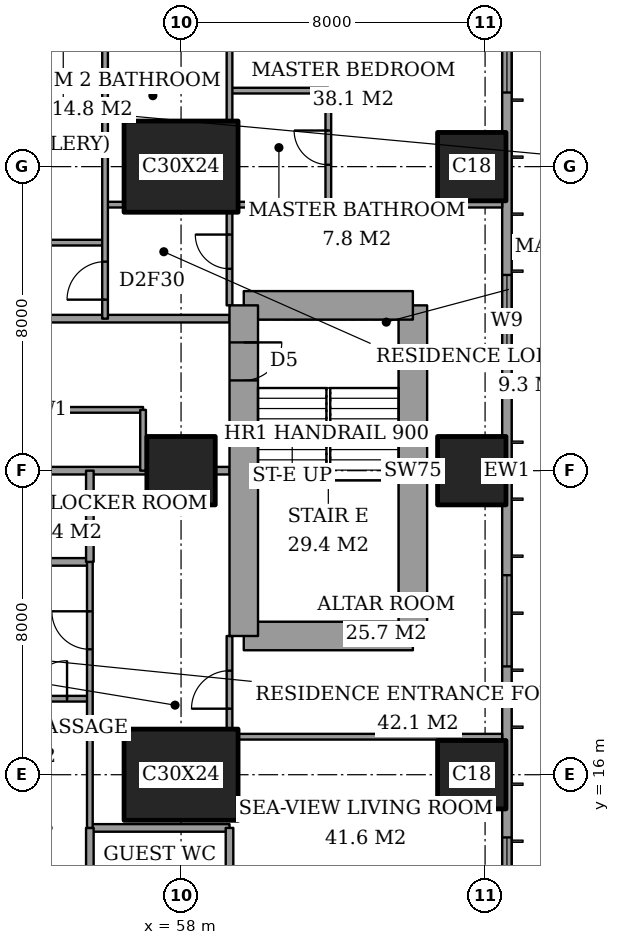
"""IFC4 building model, lengths in metres.
Left out: names, types, materials, properties, quantities, classifications, styles, units other than length and angle.
Written with IfcOpenShell. Run it as: python <this file> out.ifc"""

import sys

from ifc_helpers import new_model, si_unit, direction, frame, frame_2d, origin, origin_2d, place, context, subcontext, project, spatial, rectangle, extrude, element, fill, save


model = new_model("IFC4")
c1 = context("Model", 3, precision=1e-05, world=origin(), true_north=direction((0.0, 1.0)))
c2 = subcontext(c1, "Body", "Model", "MODEL_VIEW")
j1 = project(units=[si_unit("LENGTHUNIT", "METRE"), si_unit("PLANEANGLEUNIT", "RADIAN")], contexts=[c1])
p1 = place(None, origin())
s1 = spatial("IfcSite", under=j1, at=p1, CompositionType="ELEMENT")
p2 = place(p1, origin())
s2 = spatial("IfcBuilding", under=s1, at=p2, CompositionType="ELEMENT")
p3 = place(p2, frame((0.0, 0.0, 185.8)))
s3 = spatial("IfcBuildingStorey", under=s2, at=p3, CompositionType="ELEMENT", Elevation=185.8)
p4 = place(p3, frame((58.0, 16.0, 0.0), z_axis=(0.0, 0.0, 1.0), x_axis=(1.0, 0.0, 0.0)))
e1 = element("IfcColumn", 1, at=p4, inside=s3, PredefinedType="COLUMN", context=c2, shape_type="SweptSolid", body=[
    extrude(rectangle(XDim=3.0, YDim=2.4, at=origin_2d()), origin(), (0.0, 0.0, 1.0), 3.6),
])
p5 = place(p3, frame((58.0, 24.0, 0.0), z_axis=(0.0, 0.0, 1.0), x_axis=(1.0, 0.0, 0.0)))
e2 = element("IfcColumn", 2, at=p5, inside=s3, PredefinedType="COLUMN", context=c2, shape_type="SweptSolid", body=[
    extrude(rectangle(XDim=1.8, YDim=1.8, at=origin_2d()), origin(), (0.0, 0.0, 1.0), 3.6),
])
p6 = place(p3, frame((58.0, 32.0, 0.0), z_axis=(0.0, 0.0, 1.0), x_axis=(1.0, 0.0, 0.0)))
e3 = element("IfcColumn", 3, at=p6, inside=s3, PredefinedType="COLUMN", context=c2, shape_type="SweptSolid", body=[
    extrude(rectangle(XDim=3.0, YDim=2.4, at=origin_2d()), origin(), (0.0, 0.0, 1.0), 3.6),
])
for number, where, z_axis, x_axis in (
    (4, (65.65, 16.0, 0.0), (0.0, 0.0, 1.0), (1.0, 0.0, 0.0)),
    (5, (65.65, 24.0, 0.0), (0.0, 0.0, 1.0), (1.0, 0.0, 0.0)),
    (6, (65.65, 32.0, 0.0), (0.0, 0.0, 1.0), (1.0, 0.0, 0.0)),
):
    element("IfcColumn", number, at=place(p3, frame(where, z_axis=z_axis, x_axis=x_axis)), inside=s3, PredefinedType="COLUMN", context=c2, shape_type="SweptSolid", body=[
        extrude(rectangle(XDim=1.8, YDim=1.8, at=origin_2d()), origin(), (0.0, 0.0, 1.0), 3.6),
    ])
p7 = place(p3, frame((59.65, 19.65, 0.0), z_axis=(0.0, 0.0, 1.0), x_axis=(1.0, 0.0, 0.0)))
e7 = element("IfcWall", 7, at=p7, inside=s3, PredefinedType="SHEAR", context=c2, shape_type="SweptSolid", body=[
    extrude(rectangle(XDim=4.45, YDim=0.75, at=frame_2d((2.225, 0.0))), origin(), (0.0, 0.0, 1.0), 3.6),
])
p8 = place(p3, frame((64.1, 19.65, 0.0), z_axis=(0.0, 0.0, 1.0), x_axis=(0.0, 1.0, 0.0)))
e8 = element("IfcWall", 8, at=p8, inside=s3, PredefinedType="SHEAR", context=c2, shape_type="SweptSolid", body=[
    extrude(rectangle(XDim=8.7, YDim=0.75, at=frame_2d((4.35, 0.0))), origin(), (0.0, 0.0, 1.0), 3.6),
])
p9 = place(p3, frame((64.1, 28.35, 0.0), z_axis=(0.0, 0.0, 1.0), x_axis=(-1.0, 0.0, 0.0)))
e9 = element("IfcWall", 9, at=p9, inside=s3, PredefinedType="SHEAR", context=c2, shape_type="SweptSolid", body=[
    extrude(rectangle(XDim=4.45, YDim=0.75, at=frame_2d((2.225, 0.0))), origin(), (0.0, 0.0, 1.0), 3.6),
])
p10 = place(p3, frame((59.65, 28.35, 0.0), z_axis=(0.0, 0.0, 1.0), x_axis=(0.0, -1.0, 0.0)))
e10 = element("IfcWall", 10, at=p10, inside=s3, PredefinedType="SHEAR", context=c2, shape_type="SweptSolid", body=[
    extrude(rectangle(XDim=8.7, YDim=0.75, at=frame_2d((4.35, 0.0))), origin(), (0.0, 0.0, 1.0), 3.6),
])
p11 = place(p10, frame((0.975, 0.0, 0.0)))
e11 = element("IfcOpeningElement", 11, at=p11, cuts=e10, PredefinedType="OPENING", context=c2, shape_type="SweptSolid", body=[
    extrude(rectangle(XDim=1.0, YDim=2.1, at=frame_2d((0.5, 1.05))), frame((0.0, 0.385, 0.0), z_axis=(0.0, -1.0, 0.0), x_axis=(1.0, 0.0, 0.0)), (0.0, 0.0, 1.0), 0.77),
])
p12 = place(p3, frame((66.575, 3.175, 0.0), z_axis=(0.0, 0.0, 1.0), x_axis=(0.0, 1.0, 0.0)))
e12 = element("IfcWall", 12, at=p12, inside=s3, PredefinedType="SOLIDWALL", context=c2, shape_type="SweptSolid", body=[
    extrude(rectangle(XDim=41.65, YDim=0.25, at=frame_2d((20.825, 0.0))), origin(), (0.0, 0.0, 1.0), 3.6),
])
p13 = place(p12, frame((0.825, 0.0, 0.2)))
e13 = element("IfcOpeningElement", 13, at=p13, cuts=e12, PredefinedType="OPENING", context=c2, shape_type="SweptSolid", body=[
    extrude(rectangle(XDim=2.4, YDim=2.4, at=frame_2d((1.2, 1.2))), frame((0.0, 0.135, 0.0), z_axis=(0.0, -1.0, 0.0), x_axis=(1.0, 0.0, 0.0)), (0.0, 0.0, 1.0), 0.27),
])
p14 = place(p12, frame((6.6, 0.0, 0.2)))
e14 = element("IfcOpeningElement", 14, at=p14, cuts=e12, PredefinedType="OPENING", context=c2, shape_type="SweptSolid", body=[
    extrude(rectangle(XDim=1.2, YDim=2.4, at=frame_2d((0.6, 1.2))), frame((0.0, 0.135, 0.0), z_axis=(0.0, -1.0, 0.0), x_axis=(1.0, 0.0, 0.0)), (0.0, 0.0, 1.0), 0.27),
])
p15 = place(p12, frame((8.775, 0.0, 0.2)))
e15 = element("IfcOpeningElement", 15, at=p15, cuts=e12, PredefinedType="OPENING", context=c2, shape_type="SweptSolid", body=[
    extrude(rectangle(XDim=2.4, YDim=2.4, at=frame_2d((1.2, 1.2))), frame((0.0, 0.135, 0.0), z_axis=(0.0, -1.0, 0.0), x_axis=(1.0, 0.0, 0.0)), (0.0, 0.0, 1.0), 0.27),
])
p16 = place(p12, frame((15.675, 0.0, 0.2)))
e16 = element("IfcOpeningElement", 16, at=p16, cuts=e12, PredefinedType="OPENING", context=c2, shape_type="SweptSolid", body=[
    extrude(rectangle(XDim=2.4, YDim=2.4, at=frame_2d((1.2, 1.2))), frame((0.0, 0.135, 0.0), z_axis=(0.0, -1.0, 0.0), x_axis=(1.0, 0.0, 0.0)), (0.0, 0.0, 1.0), 0.27),
])
p17 = place(p12, frame((23.575, 0.0, 0.2)))
e17 = element("IfcOpeningElement", 17, at=p17, cuts=e12, PredefinedType="OPENING", context=c2, shape_type="SweptSolid", body=[
    extrude(rectangle(XDim=2.4, YDim=2.4, at=frame_2d((1.2, 1.2))), frame((0.0, 0.135, 0.0), z_axis=(0.0, -1.0, 0.0), x_axis=(1.0, 0.0, 0.0)), (0.0, 0.0, 1.0), 0.27),
])
p18 = place(p12, frame((30.775, 0.0, 0.2)))
e18 = element("IfcOpeningElement", 18, at=p18, cuts=e12, PredefinedType="OPENING", context=c2, shape_type="SweptSolid", body=[
    extrude(rectangle(XDim=2.4, YDim=2.4, at=frame_2d((1.2, 1.2))), frame((0.0, 0.135, 0.0), z_axis=(0.0, -1.0, 0.0), x_axis=(1.0, 0.0, 0.0)), (0.0, 0.0, 1.0), 0.27),
])
p19 = place(p12, frame((34.55, 0.0, 0.2)))
e19 = element("IfcOpeningElement", 19, at=p19, cuts=e12, PredefinedType="OPENING", context=c2, shape_type="SweptSolid", body=[
    extrude(rectangle(XDim=1.2, YDim=2.4, at=frame_2d((0.6, 1.2))), frame((0.0, 0.135, 0.0), z_axis=(0.0, -1.0, 0.0), x_axis=(1.0, 0.0, 0.0)), (0.0, 0.0, 1.0), 0.27),
])
p20 = place(p12, frame((38.425, 0.0, 0.2)))
e20 = element("IfcOpeningElement", 20, at=p20, cuts=e12, PredefinedType="OPENING", context=c2, shape_type="SweptSolid", body=[
    extrude(rectangle(XDim=2.4, YDim=2.4, at=frame_2d((1.2, 1.2))), frame((0.0, 0.135, 0.0), z_axis=(0.0, -1.0, 0.0), x_axis=(1.0, 0.0, 0.0)), (0.0, 0.0, 1.0), 0.27),
])
p21 = place(p3, frame((55.6, 14.6, 0.0), z_axis=(0.0, 0.0, 1.0), x_axis=(1.0, 0.0, 0.0)))
e21 = element("IfcWall", 21, at=p21, inside=s3, PredefinedType="PARTITIONING", context=c2, shape_type="SweptSolid", body=[
    extrude(rectangle(XDim=3.675, YDim=0.2, at=frame_2d((1.837, 0.0))), origin(), (0.0, 0.0, 1.0), 3.35),
])
p22 = place(p3, frame((59.5, 17.0, 0.0), z_axis=(0.0, 0.0, 1.0), x_axis=(1.0, 0.0, 0.0)))
e22 = element("IfcWall", 22, at=p22, inside=s3, PredefinedType="PARTITIONING", context=c2, shape_type="SweptSolid", body=[
    extrude(rectangle(XDim=6.95, YDim=0.15, at=frame_2d((3.475, 0.0))), origin(), (0.0, 0.0, 1.0), 3.35),
])
p23 = place(p3, frame((51.6, 18.0, 0.0), z_axis=(0.0, 0.0, 1.0), x_axis=(1.0, 0.0, 0.0)))
e23 = element("IfcWall", 23, at=p23, inside=s3, PredefinedType="PARTITIONING", context=c2, shape_type="SweptSolid", body=[
    extrude(rectangle(XDim=4.0, YDim=0.15, at=frame_2d((2.0, 0.0))), origin(), (0.0, 0.0, 1.0), 3.35),
])
p24 = place(p23, frame((2.4, 0.0, 0.0)))
e24 = element("IfcOpeningElement", 24, at=p24, cuts=e23, PredefinedType="OPENING", context=c2, shape_type="SweptSolid", body=[
    extrude(rectangle(XDim=1.0, YDim=2.1, at=frame_2d((0.5, 1.05))), frame((0.0, 0.085, 0.0), z_axis=(0.0, -1.0, 0.0), x_axis=(1.0, 0.0, 0.0)), (0.0, 0.0, 1.0), 0.17),
])
p25 = place(p3, frame((51.2, 21.6, 0.0), z_axis=(0.0, 0.0, 1.0), x_axis=(1.0, 0.0, 0.0)))
e25 = element("IfcWall", 25, at=p25, inside=s3, PredefinedType="PARTITIONING", context=c2, shape_type="SweptSolid", body=[
    extrude(rectangle(XDim=4.4, YDim=0.2, at=frame_2d((2.2, 0.0))), origin(), (0.0, 0.0, 1.0), 3.35),
])
p26 = place(p25, frame((1.75, 0.0, 0.0)))
e26 = element("IfcOpeningElement", 26, at=p26, cuts=e25, PredefinedType="OPENING", context=c2, shape_type="SweptSolid", body=[
    extrude(rectangle(XDim=0.9, YDim=2.1, at=frame_2d((0.45, 1.05))), frame((0.0, 0.11, 0.0), z_axis=(0.0, -1.0, 0.0), x_axis=(1.0, 0.0, 0.0)), (0.0, 0.0, 1.0), 0.22),
])
p27 = place(p3, frame((50.9, 24.0, 0.0), z_axis=(0.0, 0.0, 1.0), x_axis=(1.0, 0.0, 0.0)))
e27 = element("IfcWall", 27, at=p27, inside=s3, PredefinedType="PARTITIONING", context=c2, shape_type="SweptSolid", body=[
    extrude(rectangle(XDim=6.2, YDim=0.2, at=frame_2d((3.1, 0.0))), origin(), (0.0, 0.0, 1.0), 3.35),
])
p28 = place(p3, frame((58.9, 24.0, 0.0), z_axis=(0.0, 0.0, 1.0), x_axis=(1.0, 0.0, 0.0)))
e28 = element("IfcWall", 28, at=p28, inside=s3, PredefinedType="PARTITIONING", context=c2, shape_type="SweptSolid", body=[
    extrude(rectangle(XDim=0.375, YDim=0.2, at=frame_2d((0.188, 0.0))), origin(), (0.0, 0.0, 1.0), 3.35),
])
p29 = place(p3, frame((48.6, 25.6, 0.0), z_axis=(0.0, 0.0, 1.0), x_axis=(1.0, 0.0, 0.0)))
e29 = element("IfcWall", 29, at=p29, inside=s3, PredefinedType="PARTITIONING", context=c2, shape_type="SweptSolid", body=[
    extrude(rectangle(XDim=8.4, YDim=0.15, at=frame_2d((4.2, 0.0))), origin(), (0.0, 0.0, 1.0), 3.35),
])
p30 = place(p29, frame((3.75, 0.0, 0.0)))
e30 = element("IfcOpeningElement", 30, at=p30, cuts=e29, PredefinedType="OPENING", context=c2, shape_type="SweptSolid", body=[
    extrude(rectangle(XDim=0.9, YDim=2.1, at=frame_2d((0.45, 1.05))), frame((0.0, 0.085, 0.0), z_axis=(0.0, -1.0, 0.0), x_axis=(1.0, 0.0, 0.0)), (0.0, 0.0, 1.0), 0.17),
])
p31 = place(p3, frame((42.0, 28.0, 0.0), z_axis=(0.0, 0.0, 1.0), x_axis=(1.0, 0.0, 0.0)))
e31 = element("IfcWall", 31, at=p31, inside=s3, PredefinedType="PARTITIONING", context=c2, shape_type="SweptSolid", body=[
    extrude(rectangle(XDim=17.275, YDim=0.2, at=frame_2d((8.637, 0.0))), origin(), (0.0, 0.0, 1.0), 3.35),
])
p32 = place(p31, frame((9.4, 0.0, 0.0)))
e32 = element("IfcOpeningElement", 32, at=p32, cuts=e31, PredefinedType="OPENING", context=c2, shape_type="SweptSolid", body=[
    extrude(rectangle(XDim=1.2, YDim=2.4, at=frame_2d((0.6, 1.2))), frame((0.0, 0.11, 0.0), z_axis=(0.0, -1.0, 0.0), x_axis=(1.0, 0.0, 0.0)), (0.0, 0.0, 1.0), 0.22),
])
p33 = place(p3, frame((51.6, 30.0, 0.0), z_axis=(0.0, 0.0, 1.0), x_axis=(1.0, 0.0, 0.0)))
e33 = element("IfcWall", 33, at=p33, inside=s3, PredefinedType="PARTITIONING", context=c2, shape_type="SweptSolid", body=[
    extrude(rectangle(XDim=4.4, YDim=0.15, at=frame_2d((2.2, 0.0))), origin(), (0.0, 0.0, 1.0), 3.35),
])
p34 = place(p33, frame((0.6, 0.0, 0.0)))
e34 = element("IfcOpeningElement", 34, at=p34, cuts=e33, PredefinedType="OPENING", context=c2, shape_type="SweptSolid", body=[
    extrude(rectangle(XDim=1.0, YDim=2.1, at=frame_2d((0.5, 1.05))), frame((0.0, 0.085, 0.0), z_axis=(0.0, -1.0, 0.0), x_axis=(1.0, 0.0, 0.0)), (0.0, 0.0, 1.0), 0.17),
])
p35 = place(p3, frame((56.0, 31.0, 0.0), z_axis=(0.0, 0.0, 1.0), x_axis=(1.0, 0.0, 0.0)))
e35 = element("IfcWall", 35, at=p35, inside=s3, PredefinedType="PARTITIONING", context=c2, shape_type="SweptSolid", body=[
    extrude(rectangle(XDim=0.5, YDim=0.15, at=frame_2d((0.25, 0.0))), origin(), (0.0, 0.0, 1.0), 3.35),
])
p36 = place(p3, frame((59.5, 31.0, 0.0), z_axis=(0.0, 0.0, 1.0), x_axis=(1.0, 0.0, 0.0)))
e36 = element("IfcWall", 36, at=p36, inside=s3, PredefinedType="PARTITIONING", context=c2, shape_type="SweptSolid", body=[
    extrude(rectangle(XDim=6.95, YDim=0.15, at=frame_2d((3.475, 0.0))), origin(), (0.0, 0.0, 1.0), 3.35),
])
p37 = place(p3, frame((59.275, 34.0, 0.0), z_axis=(0.0, 0.0, 1.0), x_axis=(1.0, 0.0, 0.0)))
e37 = element("IfcWall", 37, at=p37, inside=s3, PredefinedType="PARTITIONING", context=c2, shape_type="SweptSolid", body=[
    extrude(rectangle(XDim=2.6, YDim=0.15, at=frame_2d((1.3, 0.0))), origin(), (0.0, 0.0, 1.0), 3.35),
])
p38 = place(p3, frame((55.6, 11.2, 0.0), z_axis=(0.0, 0.0, 1.0), x_axis=(0.0, 1.0, 0.0)))
e38 = element("IfcWall", 38, at=p38, inside=s3, PredefinedType="PARTITIONING", context=c2, shape_type="SweptSolid", body=[
    extrude(rectangle(XDim=3.4, YDim=0.2, at=frame_2d((1.7, 0.0))), origin(), (0.0, 0.0, 1.0), 3.35),
])
p39 = place(p3, frame((55.6, 21.6, 0.0), z_axis=(0.0, 0.0, 1.0), x_axis=(0.0, 1.0, 0.0)))
e39 = element("IfcWall", 39, at=p39, inside=s3, PredefinedType="PARTITIONING", context=c2, shape_type="SweptSolid", body=[
    extrude(rectangle(XDim=2.4, YDim=0.2, at=frame_2d((1.2, 0.0))), origin(), (0.0, 0.0, 1.0), 3.35),
])
p40 = place(p3, frame((55.6, 14.6, 0.0), z_axis=(0.0, 0.0, 1.0), x_axis=(0.0, 1.0, 0.0)))
e40 = element("IfcWall", 40, at=p40, inside=s3, PredefinedType="PARTITIONING", context=c2, shape_type="SweptSolid", body=[
    extrude(rectangle(XDim=7.0, YDim=0.15, at=frame_2d((3.5, 0.0))), origin(), (0.0, 0.0, 1.0), 3.35),
])
p41 = place(p40, frame((4.7, 0.0, 0.0)))
e41 = element("IfcOpeningElement", 41, at=p41, cuts=e40, PredefinedType="OPENING", context=c2, shape_type="SweptSolid", body=[
    extrude(rectangle(XDim=1.0, YDim=2.1, at=frame_2d((0.5, 1.05))), frame((0.0, 0.085, 0.0), z_axis=(0.0, -1.0, 0.0), x_axis=(1.0, 0.0, 0.0)), (0.0, 0.0, 1.0), 0.17),
])
p42 = place(p3, frame((56.0, 28.0, 0.0), z_axis=(0.0, 0.0, 1.0), x_axis=(0.0, 1.0, 0.0)))
e42 = element("IfcWall", 42, at=p42, inside=s3, PredefinedType="PARTITIONING", context=c2, shape_type="SweptSolid", body=[
    extrude(rectangle(XDim=9.4, YDim=0.15, at=frame_2d((4.7, 0.0))), origin(), (0.0, 0.0, 1.0), 3.35),
])
p43 = place(p42, frame((0.5, 0.0, 0.0)))
e43 = element("IfcOpeningElement", 43, at=p43, cuts=e42, PredefinedType="OPENING", context=c2, shape_type="SweptSolid", body=[
    extrude(rectangle(XDim=1.0, YDim=2.1, at=frame_2d((0.5, 1.05))), frame((0.0, 0.085, 0.0), z_axis=(0.0, -1.0, 0.0), x_axis=(1.0, 0.0, 0.0)), (0.0, 0.0, 1.0), 0.17),
])
p44 = place(p3, frame((57.0, 24.0, 0.0), z_axis=(0.0, 0.0, 1.0), x_axis=(0.0, 1.0, 0.0)))
e44 = element("IfcWall", 44, at=p44, inside=s3, PredefinedType="PARTITIONING", context=c2, shape_type="SweptSolid", body=[
    extrude(rectangle(XDim=1.6, YDim=0.15, at=frame_2d((0.8, 0.0))), origin(), (0.0, 0.0, 1.0), 3.35),
])
p45 = place(p3, frame((59.275, 11.2, 0.0), z_axis=(0.0, 0.0, 1.0), x_axis=(0.0, 1.0, 0.0)))
e45 = element("IfcWall", 45, at=p45, inside=s3, PredefinedType="PARTITIONING", context=c2, shape_type="SweptSolid", body=[
    extrude(rectangle(XDim=3.4, YDim=0.2, at=frame_2d((1.7, 0.0))), origin(), (0.0, 0.0, 1.0), 3.35),
])
p46 = place(p3, frame((59.275, 17.2, 0.0), z_axis=(0.0, 0.0, 1.0), x_axis=(0.0, 1.0, 0.0)))
e46 = element("IfcWall", 46, at=p46, inside=s3, PredefinedType="PARTITIONING", context=c2, shape_type="SweptSolid", body=[
    extrude(rectangle(XDim=2.45, YDim=0.15, at=frame_2d((1.225, 0.0))), origin(), (0.0, 0.0, 1.0), 3.35),
])
p47 = place(p46, frame((0.538, 0.0, 0.0)))
e47 = element("IfcOpeningElement", 47, at=p47, cuts=e46, PredefinedType="OPENING", context=c2, shape_type="SweptSolid", body=[
    extrude(rectangle(XDim=1.0, YDim=2.1, at=frame_2d((0.5, 1.05))), frame((0.0, 0.085, 0.0), z_axis=(0.0, -1.0, 0.0), x_axis=(1.0, 0.0, 0.0)), (0.0, 0.0, 1.0), 0.17),
])
p48 = place(p3, frame((59.275, 28.35, 0.0), z_axis=(0.0, 0.0, 1.0), x_axis=(0.0, 1.0, 0.0)))
e48 = element("IfcWall", 48, at=p48, inside=s3, PredefinedType="PARTITIONING", context=c2, shape_type="SweptSolid", body=[
    extrude(rectangle(XDim=2.45, YDim=0.15, at=frame_2d((1.225, 0.0))), origin(), (0.0, 0.0, 1.0), 3.35),
])
p49 = place(p48, frame((0.962, 0.0, 0.0)))
e49 = element("IfcOpeningElement", 49, at=p49, cuts=e48, PredefinedType="OPENING", context=c2, shape_type="SweptSolid", body=[
    extrude(rectangle(XDim=0.9, YDim=2.1, at=frame_2d((0.45, 1.05))), frame((0.0, 0.085, 0.0), z_axis=(0.0, -1.0, 0.0), x_axis=(1.0, 0.0, 0.0)), (0.0, 0.0, 1.0), 0.17),
])
p50 = place(p3, frame((59.275, 33.2, 0.0), z_axis=(0.0, 0.0, 1.0), x_axis=(0.0, 1.0, 0.0)))
e50 = element("IfcWall", 50, at=p50, inside=s3, PredefinedType="PARTITIONING", context=c2, shape_type="SweptSolid", body=[
    extrude(rectangle(XDim=4.2, YDim=0.15, at=frame_2d((2.1, 0.0))), origin(), (0.0, 0.0, 1.0), 3.35),
])
p51 = place(p3, frame((61.875, 31.0, 0.0), z_axis=(0.0, 0.0, 1.0), x_axis=(0.0, 1.0, 0.0)))
e51 = element("IfcWall", 51, at=p51, inside=s3, PredefinedType="PARTITIONING", context=c2, shape_type="SweptSolid", body=[
    extrude(rectangle(XDim=3.0, YDim=0.15, at=frame_2d((1.5, 0.0))), origin(), (0.0, 0.0, 1.0), 3.35),
])
p52 = place(p51, frame((1.05, 0.0, 0.0)))
e52 = element("IfcOpeningElement", 52, at=p52, cuts=e51, PredefinedType="OPENING", context=c2, shape_type="SweptSolid", body=[
    extrude(rectangle(XDim=0.9, YDim=2.1, at=frame_2d((0.45, 1.05))), frame((0.0, 0.085, 0.0), z_axis=(0.0, -1.0, 0.0), x_axis=(1.0, 0.0, 0.0)), (0.0, 0.0, 1.0), 0.17),
])
p53 = place(p15, origin())
e53 = element("IfcWindow", 53, at=p53, inside=s3, PartitioningType="SINGLE_PANEL", PredefinedType="WINDOW", context=c2, shape_type="SweptSolid", body=[
    extrude(rectangle(XDim=2.4, YDim=2.4, at=frame_2d((1.2, 1.2))), frame((0.0, 0.03, 0.0), z_axis=(0.0, -1.0, 0.0), x_axis=(1.0, 0.0, 0.0)), (0.0, 0.0, 1.0), 0.06),
])
fill(e15, e53)
p54 = place(p16, origin())
e54 = element("IfcWindow", 54, at=p54, inside=s3, PartitioningType="SINGLE_PANEL", PredefinedType="WINDOW", context=c2, shape_type="SweptSolid", body=[
    extrude(rectangle(XDim=2.4, YDim=2.4, at=frame_2d((1.2, 1.2))), frame((0.0, 0.03, 0.0), z_axis=(0.0, -1.0, 0.0), x_axis=(1.0, 0.0, 0.0)), (0.0, 0.0, 1.0), 0.06),
])
fill(e16, e54)
p55 = place(p17, origin())
e55 = element("IfcWindow", 55, at=p55, inside=s3, PartitioningType="SINGLE_PANEL", PredefinedType="WINDOW", context=c2, shape_type="SweptSolid", body=[
    extrude(rectangle(XDim=2.4, YDim=2.4, at=frame_2d((1.2, 1.2))), frame((0.0, 0.03, 0.0), z_axis=(0.0, -1.0, 0.0), x_axis=(1.0, 0.0, 0.0)), (0.0, 0.0, 1.0), 0.06),
])
fill(e17, e55)
p56 = place(p18, origin())
e56 = element("IfcWindow", 56, at=p56, inside=s3, PartitioningType="SINGLE_PANEL", PredefinedType="WINDOW", context=c2, shape_type="SweptSolid", body=[
    extrude(rectangle(XDim=2.4, YDim=2.4, at=frame_2d((1.2, 1.2))), frame((0.0, 0.03, 0.0), z_axis=(0.0, -1.0, 0.0), x_axis=(1.0, 0.0, 0.0)), (0.0, 0.0, 1.0), 0.06),
])
fill(e18, e56)
p57 = place(p47, origin())
e57 = element("IfcDoor", 57, at=p57, inside=s3, OperationType="SINGLE_SWING_RIGHT", PredefinedType="DOOR", context=c2, shape_type="SweptSolid", body=[
    extrude(rectangle(XDim=1.0, YDim=2.1, at=frame_2d((0.5, 1.05))), frame((0.0, 0.025, 0.0), z_axis=(0.0, -1.0, 0.0), x_axis=(1.0, 0.0, 0.0)), (0.0, 0.0, 1.0), 0.05),
])
fill(e47, e57)
p58 = place(p41, origin())
e58 = element("IfcDoor", 58, at=p58, inside=s3, OperationType="SINGLE_SWING_LEFT", PredefinedType="DOOR", context=c2, shape_type="SweptSolid", body=[
    extrude(rectangle(XDim=1.0, YDim=2.1, at=frame_2d((0.5, 1.05))), frame((0.0, 0.025, 0.0), z_axis=(0.0, -1.0, 0.0), x_axis=(1.0, 0.0, 0.0)), (0.0, 0.0, 1.0), 0.05),
])
fill(e41, e58)
p59 = place(p24, origin())
e59 = element("IfcDoor", 59, at=p59, inside=s3, OperationType="SINGLE_SWING_LEFT", PredefinedType="DOOR", context=c2, shape_type="SweptSolid", body=[
    extrude(rectangle(XDim=1.0, YDim=2.1, at=frame_2d((0.5, 1.05))), frame((0.0, 0.025, 0.0), z_axis=(0.0, -1.0, 0.0), x_axis=(1.0, 0.0, 0.0)), (0.0, 0.0, 1.0), 0.05),
])
fill(e24, e59)
p60 = place(p52, origin())
e60 = element("IfcDoor", 60, at=p60, inside=s3, OperationType="SINGLE_SWING_LEFT", PredefinedType="DOOR", context=c2, shape_type="SweptSolid", body=[
    extrude(rectangle(XDim=0.9, YDim=2.1, at=frame_2d((0.45, 1.05))), frame((0.0, 0.025, 0.0), z_axis=(0.0, -1.0, 0.0), x_axis=(1.0, 0.0, 0.0)), (0.0, 0.0, 1.0), 0.05),
])
fill(e52, e60)
p61 = place(p49, origin())
e61 = element("IfcDoor", 61, at=p61, inside=s3, OperationType="SINGLE_SWING_LEFT", PredefinedType="DOOR", context=c2, shape_type="SweptSolid", body=[
    extrude(rectangle(XDim=0.9, YDim=2.1, at=frame_2d((0.45, 1.05))), frame((0.0, 0.025, 0.0), z_axis=(0.0, -1.0, 0.0), x_axis=(1.0, 0.0, 0.0)), (0.0, 0.0, 1.0), 0.05),
])
fill(e49, e61)
p62 = place(p43, origin())
e62 = element("IfcDoor", 62, at=p62, inside=s3, OperationType="SINGLE_SWING_RIGHT", PredefinedType="DOOR", context=c2, shape_type="SweptSolid", body=[
    extrude(rectangle(XDim=1.0, YDim=2.1, at=frame_2d((0.5, 1.05))), frame((0.0, 0.025, 0.0), z_axis=(0.0, -1.0, 0.0), x_axis=(1.0, 0.0, 0.0)), (0.0, 0.0, 1.0), 0.05),
])
fill(e43, e62)
p63 = place(p11, origin())
e63 = element("IfcDoor", 63, at=p63, inside=s3, OperationType="SINGLE_SWING_RIGHT", PredefinedType="DOOR", context=c2, shape_type="SweptSolid", body=[
    extrude(rectangle(XDim=1.0, YDim=2.1, at=frame_2d((0.5, 1.05))), frame((0.0, 0.025, 0.0), z_axis=(0.0, -1.0, 0.0), x_axis=(1.0, 0.0, 0.0)), (0.0, 0.0, 1.0), 0.05),
])
fill(e11, e63)
save(model, sys.argv[1])
